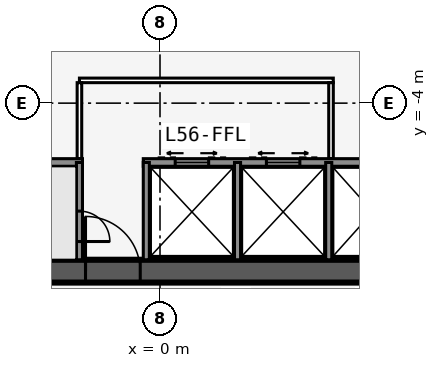
"""IFC4 building model, lengths in metres.
Left out: names, types, materials, properties, quantities, classifications, styles, units other than length and angle.
Written with IfcOpenShell. Run it as: python <this file> out.ifc"""

import sys

from ifc_helpers import new_model, si_unit, direction, frame, frame_2d, origin, place, context, subcontext, project, spatial, rectangle, extrude, element, fill, save


model = new_model("IFC4")
c1 = context("Model", 3, precision=1e-05, world=origin(), true_north=direction((0.0, 1.0)))
c2 = subcontext(c1, "Body", "Model", "MODEL_VIEW")
j1 = project(units=[si_unit("LENGTHUNIT", "METRE"), si_unit("PLANEANGLEUNIT", "RADIAN")], contexts=[c1])
p1 = place(None, origin())
s1 = spatial("IfcSite", under=j1, at=p1, CompositionType="ELEMENT")
p2 = place(p1, origin())
s2 = spatial("IfcBuilding", under=s1, at=p2, CompositionType="ELEMENT")
p3 = place(p2, frame((0.0, 0.0, 211.7)))
s3 = spatial("IfcBuildingStorey", under=s2, at=p3, CompositionType="ELEMENT", Elevation=211.7)
p4 = place(p3, frame((-16.5, -9.526, 0.0), z_axis=(0.0, 0.0, 1.0), x_axis=(1.0, 0.0, 0.0)))
e1 = element("IfcWall", 1, at=p4, inside=s3, PredefinedType="SHEAR", context=c2, shape_type="SweptSolid", body=[
    extrude(rectangle(XDim=33.0, YDim=0.75, at=frame_2d((16.5, 0.0))), origin(), (0.0, 0.0, 1.0), 3.6),
])
p5 = place(p4, frame((14.05, 0.0, 0.0)))
e2 = element("IfcOpeningElement", 2, at=p5, cuts=e1, PredefinedType="OPENING", context=c2, shape_type="SweptSolid", body=[
    extrude(rectangle(XDim=1.8, YDim=2.13, at=frame_2d((0.9, 1.065))), frame((0.0, 0.385, 0.0), z_axis=(0.0, -1.0, 0.0), x_axis=(1.0, 0.0, 0.0)), (0.0, 0.0, 1.0), 0.77),
])
p6 = place(p3, frame((-10.183, -5.951, 0.0), z_axis=(0.0, 0.0, 1.0), x_axis=(1.0, 0.0, 0.0)))
e3 = element("IfcWall", 3, at=p6, inside=s3, PredefinedType="SOLIDWALL", context=c2, shape_type="SweptSolid", body=[
    extrude(rectangle(XDim=7.633, YDim=0.25, at=frame_2d((3.816, 0.0))), origin(), (0.0, 0.0, 1.0), 3.435),
])
p7 = place(p3, frame((-0.55, -5.951, 0.0), z_axis=(0.0, 0.0, 1.0), x_axis=(1.0, 0.0, 0.0)))
e4 = element("IfcWall", 4, at=p7, inside=s3, PredefinedType="SOLIDWALL", context=c2, shape_type="SweptSolid", body=[
    extrude(rectangle(XDim=10.733, YDim=0.25, at=frame_2d((5.366, 0.0))), origin(), (0.0, 0.0, 1.0), 3.435),
])
p8 = place(p7, frame((9.314, 0.0, 0.0)))
e5 = element("IfcOpeningElement", 5, at=p8, cuts=e4, PredefinedType="OPENING", context=c2, shape_type="SweptSolid", body=[
    extrude(rectangle(XDim=0.9, YDim=2.13, at=frame_2d((0.45, 1.065))), frame((0.0, 0.135, 0.0), z_axis=(0.0, -1.0, 0.0), x_axis=(1.0, 0.0, 0.0)), (0.0, 0.0, 1.0), 0.27),
])
p9 = place(p7, frame((1.05, 0.0, 0.0)))
e6 = element("IfcOpeningElement", 6, at=p9, cuts=e4, PredefinedType="OPENING", context=c2, shape_type="SweptSolid", body=[
    extrude(rectangle(XDim=1.1, YDim=2.13, at=frame_2d((0.55, 1.065))), frame((0.0, 0.135, 0.0), z_axis=(0.0, -1.0, 0.0), x_axis=(1.0, 0.0, 0.0)), (0.0, 0.0, 1.0), 0.27),
])
p10 = place(p7, frame((4.05, 0.0, 0.0)))
e7 = element("IfcOpeningElement", 7, at=p10, cuts=e4, PredefinedType="OPENING", context=c2, shape_type="SweptSolid", body=[
    extrude(rectangle(XDim=1.1, YDim=2.13, at=frame_2d((0.55, 1.065))), frame((0.0, 0.135, 0.0), z_axis=(0.0, -1.0, 0.0), x_axis=(1.0, 0.0, 0.0)), (0.0, 0.0, 1.0), 0.27),
])
p11 = place(p3, frame((-2.65, -5.951, 0.0), z_axis=(0.0, 0.0, 1.0), x_axis=(0.0, -1.0, 0.0)))
e8 = element("IfcWall", 8, at=p11, inside=s3, PredefinedType="SOLIDWALL", context=c2, shape_type="SweptSolid", body=[
    extrude(rectangle(XDim=3.2, YDim=0.2, at=frame_2d((1.6, 0.0))), origin(), (0.0, 0.0, 1.0), 3.435),
])
p12 = place(p11, frame((1.6, 0.0, 0.0)))
e9 = element("IfcOpeningElement", 9, at=p12, cuts=e8, PredefinedType="OPENING", context=c2, shape_type="SweptSolid", body=[
    extrude(rectangle(XDim=1.0, YDim=2.13, at=frame_2d((0.5, 1.065))), frame((0.0, 0.11, 0.0), z_axis=(0.0, -1.0, 0.0), x_axis=(1.0, 0.0, 0.0)), (0.0, 0.0, 1.0), 0.22),
])
for number, where, z_axis, x_axis in (
    (10, (-0.45, -5.951, 0.0), (0.0, 0.0, 1.0), (0.0, -1.0, 0.0)),
    (11, (2.55, -5.951, 0.0), (0.0, 0.0, 1.0), (0.0, -1.0, 0.0)),
    (12, (5.55, -5.951, 0.0), (0.0, 0.0, 1.0), (0.0, -1.0, 0.0)),
):
    element("IfcWall", number, at=place(p3, frame(where, z_axis=z_axis, x_axis=x_axis)), inside=s3, PredefinedType="SOLIDWALL", context=c2, shape_type="SweptSolid", body=[
        extrude(rectangle(XDim=3.2, YDim=0.2, at=frame_2d((1.6, 0.0))), origin(), (0.0, 0.0, 1.0), 3.435),
    ])
p13 = place(p3, frame((16.5, -9.526, 0.0), z_axis=(0.0, 0.0, 1.0), x_axis=(-0.499999749417, 0.866025548458, 0.0)))
e13 = element("IfcWall", 13, at=p13, inside=s3, PredefinedType="SHEAR", context=c2, shape_type="SweptSolid", body=[
    extrude(rectangle(XDim=33.0, YDim=0.75, at=frame_2d((16.5, 0.0))), origin(), (0.0, 0.0, 1.0), 3.6),
])
p14 = place(p13, frame((14.15, 0.0, 0.0)))
e14 = element("IfcOpeningElement", 14, at=p14, cuts=e13, PredefinedType="OPENING", context=c2, shape_type="SweptSolid", body=[
    extrude(rectangle(XDim=1.8, YDim=2.13, at=frame_2d((0.9, 1.065))), frame((0.0, 0.385, 0.0), z_axis=(0.0, -1.0, 0.0), x_axis=(1.0, 0.0, 0.0)), (0.0, 0.0, 1.0), 0.77),
])
p15 = place(p13, frame((12.6, 0.0, 0.0)))
e15 = element("IfcOpeningElement", 15, at=p15, cuts=e13, PredefinedType="OPENING", context=c2, shape_type="SweptSolid", body=[
    extrude(rectangle(XDim=1.0, YDim=2.13, at=frame_2d((0.5, 1.065))), frame((0.0, 0.385, 0.0), z_axis=(0.0, -1.0, 0.0), x_axis=(1.0, 0.0, 0.0)), (0.0, 0.0, 1.0), 0.77),
])
p16 = place(p3, frame((10.245, -5.843, 0.0), z_axis=(0.0, 0.0, 1.0), x_axis=(-0.499993009313, 0.866029439822, 0.0)))
e16 = element("IfcWall", 16, at=p16, inside=s3, PredefinedType="SOLIDWALL", context=c2, shape_type="SweptSolid", body=[
    extrude(rectangle(XDim=7.733, YDim=0.25, at=frame_2d((3.866, 0.0))), origin(), (0.0, 0.0, 1.0), 3.435),
])
p17 = place(p3, frame((0.0, 19.052, 0.0), z_axis=(0.0, 0.0, 1.0), x_axis=(-0.499999749417, -0.866025548458, 0.0)))
e17 = element("IfcWall", 17, at=p17, inside=s3, PredefinedType="SHEAR", context=c2, shape_type="SweptSolid", body=[
    extrude(rectangle(XDim=33.0, YDim=0.75, at=frame_2d((16.5, 0.0))), origin(), (0.0, 0.0, 1.0), 3.6),
])
p18 = place(p17, frame((14.15, 0.0, 0.0)))
e18 = element("IfcOpeningElement", 18, at=p18, cuts=e17, PredefinedType="OPENING", context=c2, shape_type="SweptSolid", body=[
    extrude(rectangle(XDim=1.8, YDim=2.13, at=frame_2d((0.9, 1.065))), frame((0.0, 0.385, 0.0), z_axis=(0.0, -1.0, 0.0), x_axis=(1.0, 0.0, 0.0)), (0.0, 0.0, 1.0), 0.77),
])
p19 = place(p17, frame((12.6, 0.0, 0.0)))
e19 = element("IfcOpeningElement", 19, at=p19, cuts=e17, PredefinedType="OPENING", context=c2, shape_type="SweptSolid", body=[
    extrude(rectangle(XDim=1.0, YDim=2.13, at=frame_2d((0.5, 1.065))), frame((0.0, 0.385, 0.0), z_axis=(0.0, -1.0, 0.0), x_axis=(1.0, 0.0, 0.0)), (0.0, 0.0, 1.0), 0.77),
])
p20 = place(p3, frame((21.661, -12.015, 0.0), z_axis=(0.0, 0.0, 1.0), x_axis=(-0.500000605707, 0.866025054079, 0.0)))
e20 = element("IfcWall", 20, at=p20, inside=s3, PredefinedType="PARTITIONING", context=c2, shape_type="SweptSolid", body=[
    extrude(rectangle(XDim=42.472, YDim=0.15, at=frame_2d((21.236, 0.0))), origin(), (0.0, 0.0, 1.0), 3.435),
])
p21 = place(p20, frame((2.661, 0.0, 0.0)))
e21 = element("IfcOpeningElement", 21, at=p21, cuts=e20, PredefinedType="OPENING", context=c2, shape_type="SweptSolid", body=[
    extrude(rectangle(XDim=0.95, YDim=2.13, at=frame_2d((0.475, 1.065))), frame((0.0, 0.085, 0.0), z_axis=(0.0, -1.0, 0.0), x_axis=(1.0, 0.0, 0.0)), (0.0, 0.0, 1.0), 0.17),
])
p22 = place(p20, frame((7.061, 0.0, 0.0)))
e22 = element("IfcOpeningElement", 22, at=p22, cuts=e20, PredefinedType="OPENING", context=c2, shape_type="SweptSolid", body=[
    extrude(rectangle(XDim=0.95, YDim=2.13, at=frame_2d((0.475, 1.065))), frame((0.0, 0.085, 0.0), z_axis=(0.0, -1.0, 0.0), x_axis=(1.0, 0.0, 0.0)), (0.0, 0.0, 1.0), 0.17),
])
p23 = place(p20, frame((13.861, 0.0, 0.0)))
e23 = element("IfcOpeningElement", 23, at=p23, cuts=e20, PredefinedType="OPENING", context=c2, shape_type="SweptSolid", body=[
    extrude(rectangle(XDim=0.95, YDim=2.13, at=frame_2d((0.475, 1.065))), frame((0.0, 0.085, 0.0), z_axis=(0.0, -1.0, 0.0), x_axis=(1.0, 0.0, 0.0)), (0.0, 0.0, 1.0), 0.17),
])
p24 = place(p20, frame((22.061, 0.0, 0.0)))
e24 = element("IfcOpeningElement", 24, at=p24, cuts=e20, PredefinedType="OPENING", context=c2, shape_type="SweptSolid", body=[
    extrude(rectangle(XDim=0.95, YDim=2.13, at=frame_2d((0.475, 1.065))), frame((0.0, 0.085, 0.0), z_axis=(0.0, -1.0, 0.0), x_axis=(1.0, 0.0, 0.0)), (0.0, 0.0, 1.0), 0.17),
])
p25 = place(p20, frame((28.261, 0.0, 0.0)))
e25 = element("IfcOpeningElement", 25, at=p25, cuts=e20, PredefinedType="OPENING", context=c2, shape_type="SweptSolid", body=[
    extrude(rectangle(XDim=0.95, YDim=2.13, at=frame_2d((0.475, 1.065))), frame((0.0, 0.085, 0.0), z_axis=(0.0, -1.0, 0.0), x_axis=(1.0, 0.0, 0.0)), (0.0, 0.0, 1.0), 0.17),
])
p26 = place(p20, frame((38.861, 0.0, 0.0)))
e26 = element("IfcOpeningElement", 26, at=p26, cuts=e20, PredefinedType="OPENING", context=c2, shape_type="SweptSolid", body=[
    extrude(rectangle(XDim=0.95, YDim=2.13, at=frame_2d((0.475, 1.065))), frame((0.0, 0.085, 0.0), z_axis=(0.0, -1.0, 0.0), x_axis=(1.0, 0.0, 0.0)), (0.0, 0.0, 1.0), 0.17),
])
p27 = place(p3, frame((-0.425, 22.966, 0.0), z_axis=(0.0, 0.0, 1.0), x_axis=(-0.500000265775, -0.866025250339, 0.0)))
e27 = element("IfcWall", 27, at=p27, inside=s3, PredefinedType="PARTITIONING", context=c2, shape_type="SweptSolid", body=[
    extrude(rectangle(XDim=39.354, YDim=0.15, at=frame_2d((19.677, 0.0))), origin(), (0.0, 0.0, 1.0), 3.435),
])
p28 = place(p27, frame((1.102, 0.0, 0.0)))
e28 = element("IfcOpeningElement", 28, at=p28, cuts=e27, PredefinedType="OPENING", context=c2, shape_type="SweptSolid", body=[
    extrude(rectangle(XDim=0.95, YDim=2.13, at=frame_2d((0.475, 1.065))), frame((0.0, 0.085, 0.0), z_axis=(0.0, -1.0, 0.0), x_axis=(1.0, 0.0, 0.0)), (0.0, 0.0, 1.0), 0.17),
])
p29 = place(p27, frame((6.702, 0.0, 0.0)))
e29 = element("IfcOpeningElement", 29, at=p29, cuts=e27, PredefinedType="OPENING", context=c2, shape_type="SweptSolid", body=[
    extrude(rectangle(XDim=0.95, YDim=2.13, at=frame_2d((0.475, 1.065))), frame((0.0, 0.085, 0.0), z_axis=(0.0, -1.0, 0.0), x_axis=(1.0, 0.0, 0.0)), (0.0, 0.0, 1.0), 0.17),
])
p30 = place(p27, frame((16.702, 0.0, 0.0)))
e30 = element("IfcOpeningElement", 30, at=p30, cuts=e27, PredefinedType="OPENING", context=c2, shape_type="SweptSolid", body=[
    extrude(rectangle(XDim=0.95, YDim=2.13, at=frame_2d((0.475, 1.065))), frame((0.0, 0.085, 0.0), z_axis=(0.0, -1.0, 0.0), x_axis=(1.0, 0.0, 0.0)), (0.0, 0.0, 1.0), 0.17),
])
p31 = place(p27, frame((26.102, 0.0, 0.0)))
e31 = element("IfcOpeningElement", 31, at=p31, cuts=e27, PredefinedType="OPENING", context=c2, shape_type="SweptSolid", body=[
    extrude(rectangle(XDim=0.95, YDim=2.13, at=frame_2d((0.475, 1.065))), frame((0.0, 0.085, 0.0), z_axis=(0.0, -1.0, 0.0), x_axis=(1.0, 0.0, 0.0)), (0.0, 0.0, 1.0), 0.17),
])
p32 = place(p27, frame((32.302, 0.0, 0.0)))
e32 = element("IfcOpeningElement", 32, at=p32, cuts=e27, PredefinedType="OPENING", context=c2, shape_type="SweptSolid", body=[
    extrude(rectangle(XDim=0.95, YDim=2.13, at=frame_2d((0.475, 1.065))), frame((0.0, 0.085, 0.0), z_axis=(0.0, -1.0, 0.0), x_axis=(1.0, 0.0, 0.0)), (0.0, 0.0, 1.0), 0.17),
])
p33 = place(p27, frame((37.302, 0.0, 0.0)))
e33 = element("IfcOpeningElement", 33, at=p33, cuts=e27, PredefinedType="OPENING", context=c2, shape_type="SweptSolid", body=[
    extrude(rectangle(XDim=0.95, YDim=2.13, at=frame_2d((0.475, 1.065))), frame((0.0, 0.085, 0.0), z_axis=(0.0, -1.0, 0.0), x_axis=(1.0, 0.0, 0.0)), (0.0, 0.0, 1.0), 0.17),
])
p34 = place(p3, frame((-2.65, -3.251, 0.0), z_axis=(0.0, 0.0, 1.0), x_axis=(1.0, 0.0, 0.0)))
e34 = element("IfcWall", 34, at=p34, inside=s3, PredefinedType="PARTITIONING", context=c2, shape_type="SweptSolid", body=[
    extrude(rectangle(XDim=8.35, YDim=0.15, at=frame_2d((4.175, 0.0))), origin(), (0.0, 0.0, 1.0), 3.435),
])
for number, where, z_axis, x_axis in (
    (35, (-2.65, -5.826, 0.0), (0.0, 0.0, 1.0), (0.0, 1.0, 0.0)),
    (36, (5.625, -5.826, 0.0), (0.0, 0.0, 1.0), (0.0, 1.0, 0.0)),
):
    element("IfcWall", number, at=place(p3, frame(where, z_axis=z_axis, x_axis=x_axis)), inside=s3, PredefinedType="PARTITIONING", context=c2, shape_type="SweptSolid", body=[
        extrude(rectangle(XDim=2.5, YDim=0.15, at=frame_2d((1.25, 0.0))), origin(), (0.0, 0.0, 1.0), 3.435),
    ])
p35 = place(p5, origin())
e37 = element("IfcDoor", 37, at=p35, inside=s3, OperationType="DOUBLE_DOOR_SINGLE_SWING", PredefinedType="DOOR", context=c2, shape_type="SweptSolid", body=[
    extrude(rectangle(XDim=1.8, YDim=2.13, at=frame_2d((0.9, 1.065))), frame((0.0, 0.025, 0.0), z_axis=(0.0, -1.0, 0.0), x_axis=(1.0, 0.0, 0.0)), (0.0, 0.0, 1.0), 0.05),
])
fill(e2, e37)
p36 = place(p12, origin())
e38 = element("IfcDoor", 38, at=p36, inside=s3, OperationType="SINGLE_SWING_RIGHT", PredefinedType="DOOR", context=c2, shape_type="SweptSolid", body=[
    extrude(rectangle(XDim=1.0, YDim=2.13, at=frame_2d((0.5, 1.065))), frame((0.0, 0.025, 0.0), z_axis=(0.0, -1.0, 0.0), x_axis=(1.0, 0.0, 0.0)), (0.0, 0.0, 1.0), 0.05),
])
fill(e9, e38)
p37 = place(p9, origin())
e39 = element("IfcDoor", 39, at=p37, inside=s3, OperationType="DOUBLE_DOOR_SLIDING", PredefinedType="USERDEFINED", context=c2, shape_type="SweptSolid", body=[
    extrude(rectangle(XDim=1.1, YDim=2.13, at=frame_2d((0.55, 1.065))), frame((0.0, 0.025, 0.0), z_axis=(0.0, -1.0, 0.0), x_axis=(1.0, 0.0, 0.0)), (0.0, 0.0, 1.0), 0.05),
])
fill(e6, e39)
p38 = place(p10, origin())
e40 = element("IfcDoor", 40, at=p38, inside=s3, OperationType="DOUBLE_DOOR_SLIDING", PredefinedType="USERDEFINED", context=c2, shape_type="SweptSolid", body=[
    extrude(rectangle(XDim=1.1, YDim=2.13, at=frame_2d((0.55, 1.065))), frame((0.0, 0.025, 0.0), z_axis=(0.0, -1.0, 0.0), x_axis=(1.0, 0.0, 0.0)), (0.0, 0.0, 1.0), 0.05),
])
fill(e7, e40)
save(model, sys.argv[1])
